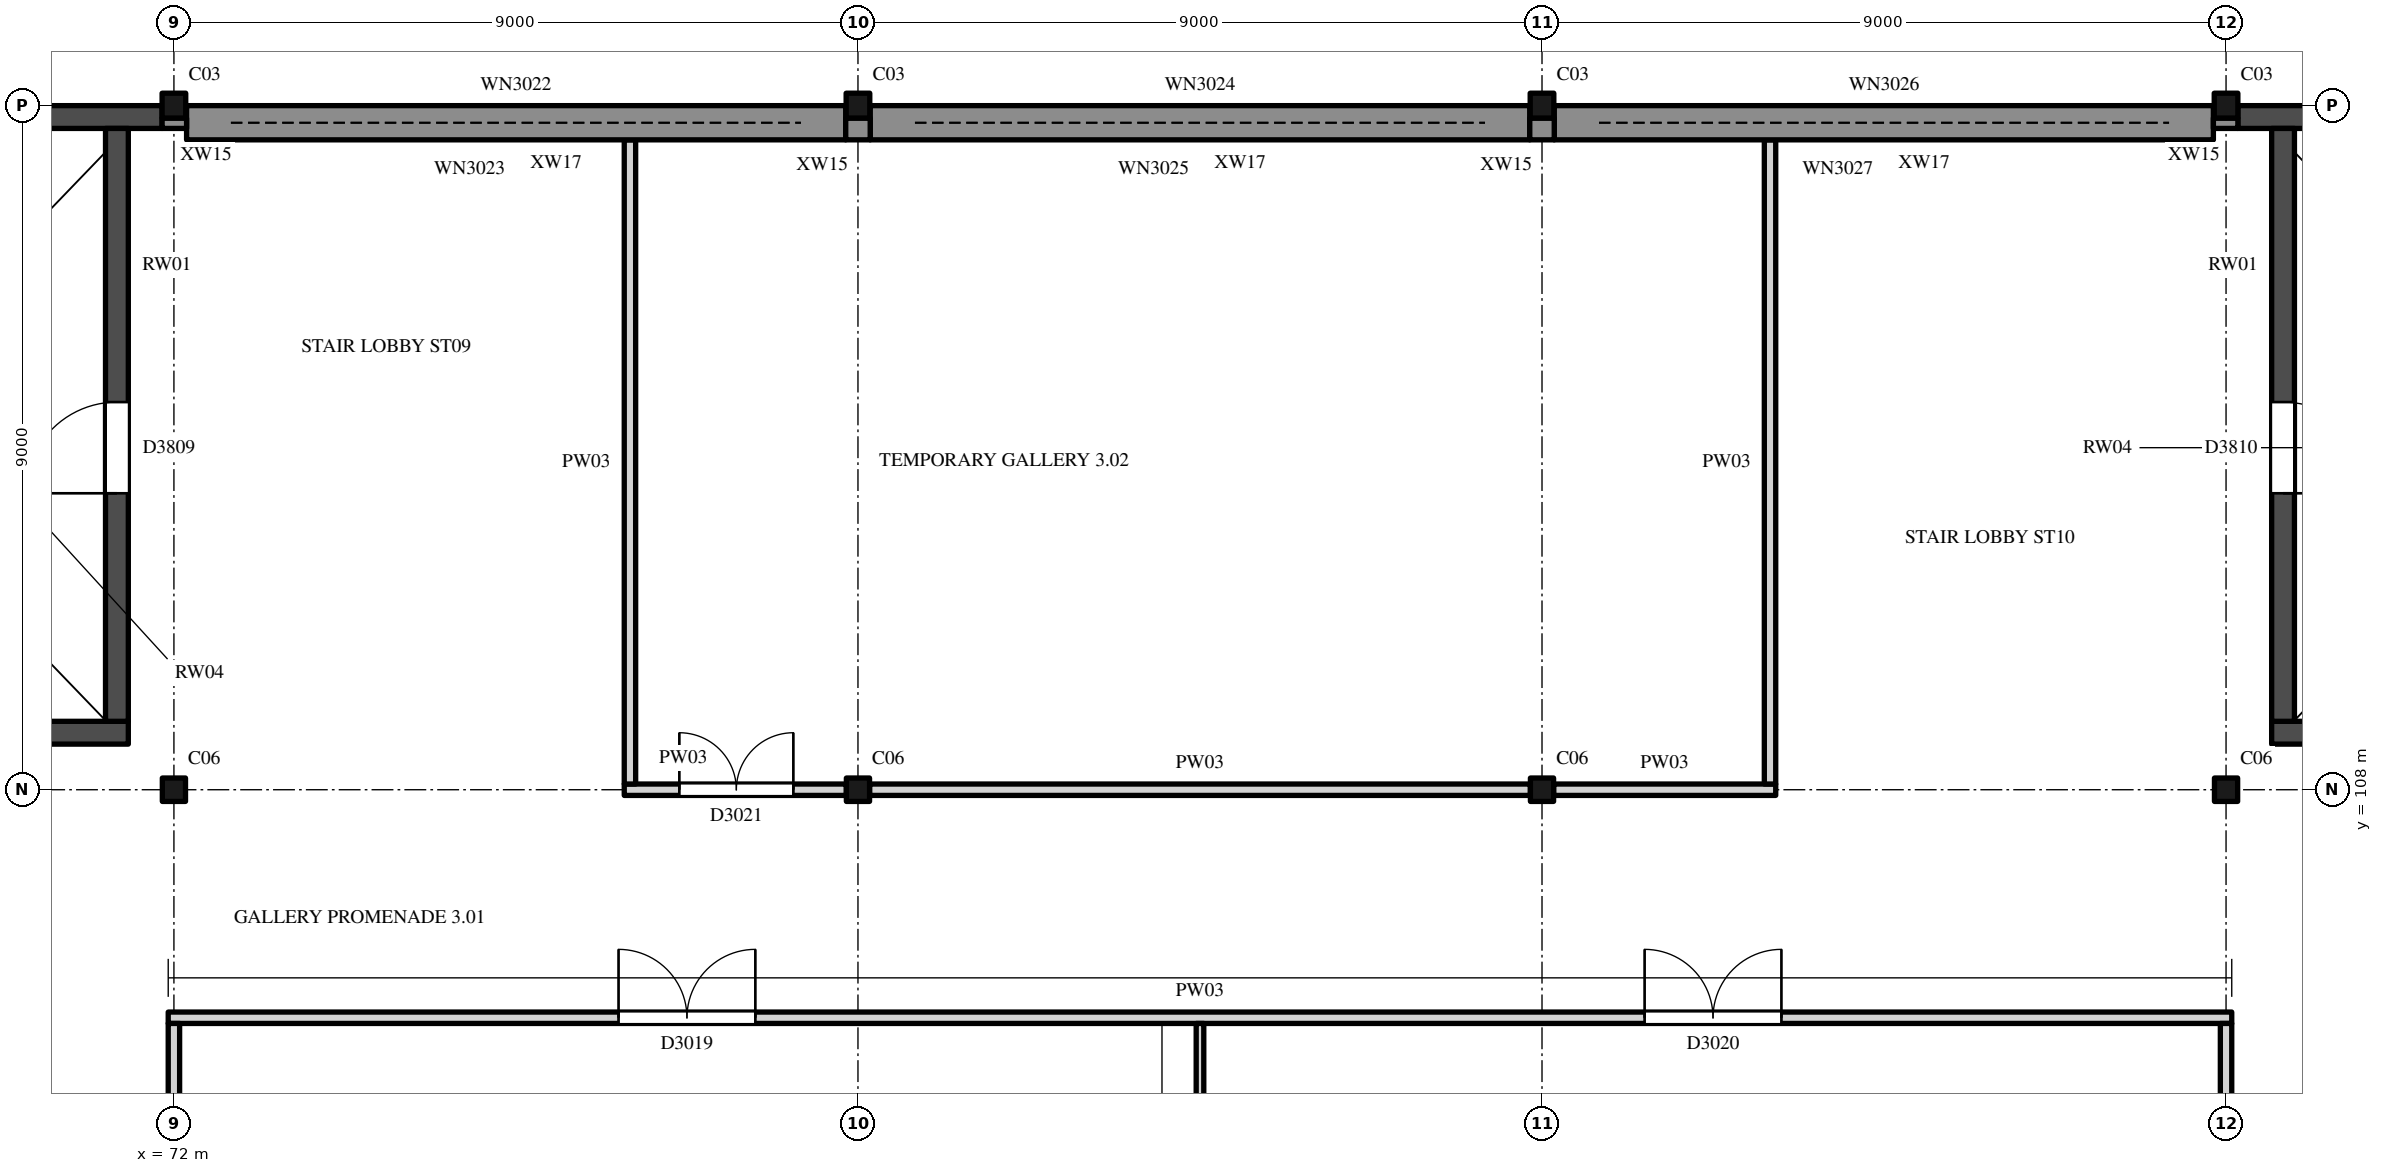
"""IFC4 building model, lengths in metres.
Left out: names, types, materials, properties, quantities, classifications, styles, units other than length and angle.
Written with IfcOpenShell. Run it as: python <this file> out.ifc"""

import sys

from ifc_helpers import new_model, si_unit, direction, frame, frame_2d, origin, origin_2d, place, context, subcontext, project, spatial, rectangle, i_section, extrude, element, fill, save


model = new_model("IFC4")
c1 = context("Model", 3, precision=1e-05, world=origin(), true_north=direction((0.0, 1.0)))
c2 = subcontext(c1, "Body", "Model", "MODEL_VIEW")
j1 = project(units=[si_unit("LENGTHUNIT", "METRE"), si_unit("PLANEANGLEUNIT", "RADIAN")], contexts=[c1])
p1 = place(None, origin())
s1 = spatial("IfcSite", under=j1, at=p1, CompositionType="ELEMENT")
p2 = place(p1, origin())
s2 = spatial("IfcBuilding", under=s1, at=p2, CompositionType="ELEMENT")
p3 = place(p2, frame((0.0, 0.0, 16.0)))
s3 = spatial("IfcBuildingStorey", under=s2, at=p3, CompositionType="ELEMENT", Elevation=16.0)
for number, where, z_axis, x_axis in (
    (1, (72.0, 108.0, 0.0), (0.0, 0.0, 1.0), (1.0, 0.0, 0.0)),
    (2, (81.0, 108.0, 0.0), (0.0, 0.0, 1.0), (1.0, 0.0, 0.0)),
    (3, (90.0, 108.0, 0.0), (0.0, 0.0, 1.0), (1.0, 0.0, 0.0)),
    (4, (99.0, 108.0, 0.0), (0.0, 0.0, 1.0), (1.0, 0.0, 0.0)),
):
    element("IfcColumn", number, at=place(p3, frame(where, z_axis=z_axis, x_axis=x_axis)), inside=s3, PredefinedType="COLUMN", context=c2, shape_type="SweptSolid", body=[
        extrude(i_section(OverallWidth=0.305, OverallDepth=0.308, WebThickness=0.01, FlangeThickness=0.015, FilletRadius=0.017, at=origin_2d()), origin(), (0.0, 0.0, 1.0), 10.0),
    ])
for number, where, z_axis, x_axis in (
    (5, (72.0, 117.0, 0.0), (0.0, 0.0, 1.0), (1.0, 0.0, 0.0)),
    (6, (81.0, 117.0, 0.0), (0.0, 0.0, 1.0), (1.0, 0.0, 0.0)),
    (7, (90.0, 117.0, 0.0), (0.0, 0.0, 1.0), (1.0, 0.0, 0.0)),
    (8, (99.0, 117.0, 0.0), (0.0, 0.0, 1.0), (1.0, 0.0, 0.0)),
):
    element("IfcColumn", number, at=place(p3, frame(where, z_axis=z_axis, x_axis=x_axis)), inside=s3, PredefinedType="COLUMN", context=c2, shape_type="SweptSolid", body=[
        extrude(i_section(OverallWidth=0.311, OverallDepth=0.327, WebThickness=0.016, FlangeThickness=0.025, FilletRadius=0.017, at=origin_2d()), origin(), (0.0, 0.0, 1.0), 10.0),
    ])
p4 = place(p3, frame((63.6, 108.75, 0.0), z_axis=(0.0, 0.0, 1.0), x_axis=(1.0, 0.0, 0.0)))
e9 = element("IfcWall", 9, at=p4, inside=s3, PredefinedType="SHEAR", context=c2, shape_type="SweptSolid", body=[
    extrude(rectangle(XDim=7.8, YDim=0.3, at=frame_2d((3.9, 0.0))), origin(), (0.0, 0.0, 1.0), 10.0),
])
p5 = place(p3, frame((63.156, 116.85, 0.0), z_axis=(0.0, 0.0, 1.0), x_axis=(1.0, 0.0, 0.0)))
e10 = element("IfcWall", 10, at=p5, inside=s3, PredefinedType="SHEAR", context=c2, shape_type="SweptSolid", body=[
    extrude(rectangle(XDim=8.689, YDim=0.3, at=frame_2d((4.344, 0.0))), origin(), (0.0, 0.0, 1.0), 10.0),
])
p6 = place(p3, frame((71.25, 108.9, 0.0), z_axis=(0.0, 0.0, 1.0), x_axis=(0.0, 1.0, 0.0)))
e11 = element("IfcWall", 11, at=p6, inside=s3, PredefinedType="SHEAR", context=c2, shape_type="SweptSolid", body=[
    extrude(rectangle(XDim=7.8, YDim=0.3, at=frame_2d((3.9, 0.0))), origin(), (0.0, 0.0, 1.0), 10.0),
])
p7 = place(p6, frame((3.0, 0.0, 0.0)))
e12 = element("IfcOpeningElement", 12, at=p7, cuts=e11, PredefinedType="OPENING", context=c2, shape_type="SweptSolid", body=[
    extrude(rectangle(XDim=1.2, YDim=2.1, at=frame_2d((0.6, 1.05))), frame((0.0, 0.16, 0.0), z_axis=(0.0, -1.0, 0.0), x_axis=(1.0, 0.0, 0.0)), (0.0, 0.0, 1.0), 0.32),
])
p8 = place(p3, frame((99.6, 108.75, 0.0), z_axis=(0.0, 0.0, 1.0), x_axis=(1.0, 0.0, 0.0)))
e13 = element("IfcWall", 13, at=p8, inside=s3, PredefinedType="SHEAR", context=c2, shape_type="SweptSolid", body=[
    extrude(rectangle(XDim=7.8, YDim=0.3, at=frame_2d((3.9, 0.0))), origin(), (0.0, 0.0, 1.0), 10.0),
])
p9 = place(p3, frame((99.156, 116.85, 0.0), z_axis=(0.0, 0.0, 1.0), x_axis=(1.0, 0.0, 0.0)))
e14 = element("IfcWall", 14, at=p9, inside=s3, PredefinedType="SHEAR", context=c2, shape_type="SweptSolid", body=[
    extrude(rectangle(XDim=8.689, YDim=0.3, at=frame_2d((4.344, 0.0))), origin(), (0.0, 0.0, 1.0), 10.0),
])
p10 = place(p3, frame((99.75, 108.9, 0.0), z_axis=(0.0, 0.0, 1.0), x_axis=(0.0, 1.0, 0.0)))
e15 = element("IfcWall", 15, at=p10, inside=s3, PredefinedType="SHEAR", context=c2, shape_type="SweptSolid", body=[
    extrude(rectangle(XDim=7.8, YDim=0.3, at=frame_2d((3.9, 0.0))), origin(), (0.0, 0.0, 1.0), 10.0),
])
p11 = place(p10, frame((3.0, 0.0, 0.0)))
e16 = element("IfcOpeningElement", 16, at=p11, cuts=e15, PredefinedType="OPENING", context=c2, shape_type="SweptSolid", body=[
    extrude(rectangle(XDim=1.2, YDim=2.1, at=frame_2d((0.6, 1.05))), frame((0.0, 0.16, 0.0), z_axis=(0.0, -1.0, 0.0), x_axis=(1.0, 0.0, 0.0)), (0.0, 0.0, 1.0), 0.32),
])
p12 = place(p3, frame((72.167, 116.775, 0.0), z_axis=(0.0, 0.0, 1.0), x_axis=(1.0, 0.0, 0.0)))
e17 = element("IfcWall", 17, at=p12, inside=s3, PredefinedType="SOLIDWALL", context=c2, shape_type="SweptSolid", body=[
    extrude(rectangle(XDim=8.673, YDim=0.45, at=frame_2d((4.336, 0.0))), origin(), (0.0, 0.0, 1.0), 9.473),
])
p13 = place(p12, frame((0.583, 0.0, 1.6)))
e18 = element("IfcOpeningElement", 18, at=p13, cuts=e17, PredefinedType="OPENING", context=c2, shape_type="SweptSolid", body=[
    extrude(rectangle(XDim=7.5, YDim=1.2, at=frame_2d((3.75, 0.6))), frame((0.0, 0.235, 0.0), z_axis=(0.0, -1.0, 0.0), x_axis=(1.0, 0.0, 0.0)), (0.0, 0.0, 1.0), 0.47),
])
p14 = place(p12, frame((0.583, 0.0, 6.4)))
e19 = element("IfcOpeningElement", 19, at=p14, cuts=e17, PredefinedType="OPENING", context=c2, shape_type="SweptSolid", body=[
    extrude(rectangle(XDim=7.5, YDim=1.2, at=frame_2d((3.75, 0.6))), frame((0.0, 0.235, 0.0), z_axis=(0.0, -1.0, 0.0), x_axis=(1.0, 0.0, 0.0)), (0.0, 0.0, 1.0), 0.47),
])
p15 = place(p3, frame((81.161, 116.775, 0.0), z_axis=(0.0, 0.0, 1.0), x_axis=(1.0, 0.0, 0.0)))
e20 = element("IfcWall", 20, at=p15, inside=s3, PredefinedType="SOLIDWALL", context=c2, shape_type="SweptSolid", body=[
    extrude(rectangle(XDim=8.678, YDim=0.45, at=frame_2d((4.339, 0.0))), origin(), (0.0, 0.0, 1.0), 9.473),
])
p16 = place(p15, frame((0.589, 0.0, 1.6)))
e21 = element("IfcOpeningElement", 21, at=p16, cuts=e20, PredefinedType="OPENING", context=c2, shape_type="SweptSolid", body=[
    extrude(rectangle(XDim=7.5, YDim=1.2, at=frame_2d((3.75, 0.6))), frame((0.0, 0.235, 0.0), z_axis=(0.0, -1.0, 0.0), x_axis=(1.0, 0.0, 0.0)), (0.0, 0.0, 1.0), 0.47),
])
p17 = place(p15, frame((0.589, 0.0, 6.4)))
e22 = element("IfcOpeningElement", 22, at=p17, cuts=e20, PredefinedType="OPENING", context=c2, shape_type="SweptSolid", body=[
    extrude(rectangle(XDim=7.5, YDim=1.2, at=frame_2d((3.75, 0.6))), frame((0.0, 0.235, 0.0), z_axis=(0.0, -1.0, 0.0), x_axis=(1.0, 0.0, 0.0)), (0.0, 0.0, 1.0), 0.47),
])
p18 = place(p3, frame((90.161, 116.775, 0.0), z_axis=(0.0, 0.0, 1.0), x_axis=(1.0, 0.0, 0.0)))
e23 = element("IfcWall", 23, at=p18, inside=s3, PredefinedType="SOLIDWALL", context=c2, shape_type="SweptSolid", body=[
    extrude(rectangle(XDim=8.673, YDim=0.45, at=frame_2d((4.336, 0.0))), origin(), (0.0, 0.0, 1.0), 9.473),
])
p19 = place(p18, frame((0.589, 0.0, 1.6)))
e24 = element("IfcOpeningElement", 24, at=p19, cuts=e23, PredefinedType="OPENING", context=c2, shape_type="SweptSolid", body=[
    extrude(rectangle(XDim=7.5, YDim=1.2, at=frame_2d((3.75, 0.6))), frame((0.0, 0.235, 0.0), z_axis=(0.0, -1.0, 0.0), x_axis=(1.0, 0.0, 0.0)), (0.0, 0.0, 1.0), 0.47),
])
p20 = place(p18, frame((0.589, 0.0, 6.4)))
e25 = element("IfcOpeningElement", 25, at=p20, cuts=e23, PredefinedType="OPENING", context=c2, shape_type="SweptSolid", body=[
    extrude(rectangle(XDim=7.5, YDim=1.2, at=frame_2d((3.75, 0.6))), frame((0.0, 0.235, 0.0), z_axis=(0.0, -1.0, 0.0), x_axis=(1.0, 0.0, 0.0)), (0.0, 0.0, 1.0), 0.47),
])
p21 = place(p3, frame((71.844, 116.768, 0.0), z_axis=(0.0, 0.0, 1.0), x_axis=(1.0, 0.0, 0.0)))
e26 = element("IfcWall", 26, at=p21, inside=s3, PredefinedType="SOLIDWALL", context=c2, shape_type="SweptSolid", body=[
    extrude(rectangle(XDim=0.322, YDim=0.136, at=frame_2d((0.161, 0.0))), origin(), (0.0, 0.0, 1.0), 10.0),
])
for number, where, z_axis, x_axis in (
    (27, (80.839, 116.693, 0.0), (0.0, 0.0, 1.0), (1.0, 0.0, 0.0)),
    (28, (89.839, 116.693, 0.0), (0.0, 0.0, 1.0), (1.0, 0.0, 0.0)),
):
    element("IfcWall", number, at=place(p3, frame(where, z_axis=z_axis, x_axis=x_axis)), inside=s3, PredefinedType="SOLIDWALL", context=c2, shape_type="SweptSolid", body=[
        extrude(rectangle(XDim=0.322, YDim=0.286, at=frame_2d((0.161, 0.0))), origin(), (0.0, 0.0, 1.0), 9.473),
    ])
p22 = place(p3, frame((98.833, 116.768, 0.0), z_axis=(0.0, 0.0, 1.0), x_axis=(1.0, 0.0, 0.0)))
e29 = element("IfcWall", 29, at=p22, inside=s3, PredefinedType="SOLIDWALL", context=c2, shape_type="SweptSolid", body=[
    extrude(rectangle(XDim=0.322, YDim=0.136, at=frame_2d((0.161, 0.0))), origin(), (0.0, 0.0, 1.0), 10.0),
])
p23 = place(p3, frame((71.925, 105.0, 0.0), z_axis=(0.0, 0.0, 1.0), x_axis=(1.0, 0.0, 0.0)))
e30 = element("IfcWall", 30, at=p23, inside=s3, PredefinedType="PARTITIONING", context=c2, shape_type="SweptSolid", body=[
    extrude(rectangle(XDim=27.15, YDim=0.15, at=frame_2d((13.575, 0.0))), origin(), (0.0, 0.0, 1.0), 9.521),
])
p24 = place(p23, frame((5.925, 0.0, 0.0)))
e31 = element("IfcOpeningElement", 31, at=p24, cuts=e30, PredefinedType="OPENING", context=c2, shape_type="SweptSolid", body=[
    extrude(rectangle(XDim=1.8, YDim=2.4, at=frame_2d((0.9, 1.2))), frame((0.0, 0.085, 0.0), z_axis=(0.0, -1.0, 0.0), x_axis=(1.0, 0.0, 0.0)), (0.0, 0.0, 1.0), 0.17),
])
p25 = place(p23, frame((19.425, 0.0, 0.0)))
e32 = element("IfcOpeningElement", 32, at=p25, cuts=e30, PredefinedType="OPENING", context=c2, shape_type="SweptSolid", body=[
    extrude(rectangle(XDim=1.8, YDim=2.4, at=frame_2d((0.9, 1.2))), frame((0.0, 0.085, 0.0), z_axis=(0.0, -1.0, 0.0), x_axis=(1.0, 0.0, 0.0)), (0.0, 0.0, 1.0), 0.17),
])
p26 = place(p3, frame((77.925, 108.0, 0.0), z_axis=(0.0, 0.0, 1.0), x_axis=(1.0, 0.0, 0.0)))
e33 = element("IfcWall", 33, at=p26, inside=s3, PredefinedType="PARTITIONING", context=c2, shape_type="SweptSolid", body=[
    extrude(rectangle(XDim=2.922, YDim=0.15, at=frame_2d((1.461, 0.0))), origin(), (0.0, 0.0, 1.0), 9.473),
])
p27 = place(p26, frame((0.725, 0.0, 0.0)))
e34 = element("IfcOpeningElement", 34, at=p27, cuts=e33, PredefinedType="OPENING", context=c2, shape_type="SweptSolid", body=[
    extrude(rectangle(XDim=1.5, YDim=2.4, at=frame_2d((0.75, 1.2))), frame((0.0, 0.085, 0.0), z_axis=(0.0, -1.0, 0.0), x_axis=(1.0, 0.0, 0.0)), (0.0, 0.0, 1.0), 0.17),
])
p28 = place(p3, frame((81.153, 108.0, 0.0), z_axis=(0.0, 0.0, 1.0), x_axis=(1.0, 0.0, 0.0)))
e35 = element("IfcWall", 35, at=p28, inside=s3, PredefinedType="PARTITIONING", context=c2, shape_type="SweptSolid", body=[
    extrude(rectangle(XDim=8.695, YDim=0.15, at=frame_2d((4.347, 0.0))), origin(), (0.0, 0.0, 1.0), 9.473),
])
p29 = place(p3, frame((90.153, 108.0, 0.0), z_axis=(0.0, 0.0, 1.0), x_axis=(1.0, 0.0, 0.0)))
e36 = element("IfcWall", 36, at=p29, inside=s3, PredefinedType="PARTITIONING", context=c2, shape_type="SweptSolid", body=[
    extrude(rectangle(XDim=2.922, YDim=0.15, at=frame_2d((1.461, 0.0))), origin(), (0.0, 0.0, 1.0), 9.473),
])
p30 = place(p3, frame((72.0, 99.154, 0.0), z_axis=(0.0, 0.0, 1.0), x_axis=(0.0, 1.0, 0.0)))
e37 = element("IfcWall", 37, at=p30, inside=s3, PredefinedType="PARTITIONING", context=c2, shape_type="SweptSolid", body=[
    extrude(rectangle(XDim=5.771, YDim=0.15, at=frame_2d((2.885, 0.0))), origin(), (0.0, 0.0, 1.0), 9.371),
])
p31 = place(p3, frame((78.0, 108.075, 0.0), z_axis=(0.0, 0.0, 1.0), x_axis=(0.0, 1.0, 0.0)))
e38 = element("IfcWall", 38, at=p31, inside=s3, PredefinedType="PARTITIONING", context=c2, shape_type="SweptSolid", body=[
    extrude(rectangle(XDim=8.475, YDim=0.15, at=frame_2d((4.238, 0.0))), origin(), (0.0, 0.0, 1.0), 9.825),
])
p32 = place(p3, frame((85.5, 90.05, 0.0), z_axis=(0.0, 0.0, 1.0), x_axis=(0.0, 1.0, 0.0)))
e39 = element("IfcWall", 39, at=p32, inside=s3, PredefinedType="PARTITIONING", context=c2, shape_type="SweptSolid", body=[
    extrude(rectangle(XDim=14.875, YDim=0.1, at=frame_2d((7.438, 0.0))), origin(), (0.0, 0.0, 1.0), 9.825),
])
p33 = place(p32, frame((6.55, 0.0, 0.0)))
e40 = element("IfcOpeningElement", 40, at=p33, cuts=e39, PredefinedType="OPENING", context=c2, shape_type="SweptSolid", body=[
    extrude(rectangle(XDim=1.8, YDim=2.4, at=frame_2d((0.9, 1.2))), frame((0.0, 0.06, 0.0), z_axis=(0.0, -1.0, 0.0), x_axis=(1.0, 0.0, 0.0)), (0.0, 0.0, 1.0), 0.12),
])
p34 = place(p3, frame((93.0, 108.075, 0.0), z_axis=(0.0, 0.0, 1.0), x_axis=(0.0, 1.0, 0.0)))
e41 = element("IfcWall", 41, at=p34, inside=s3, PredefinedType="PARTITIONING", context=c2, shape_type="SweptSolid", body=[
    extrude(rectangle(XDim=8.475, YDim=0.15, at=frame_2d((4.238, 0.0))), origin(), (0.0, 0.0, 1.0), 9.825),
])
p35 = place(p3, frame((99.0, 99.154, 0.0), z_axis=(0.0, 0.0, 1.0), x_axis=(0.0, 1.0, 0.0)))
e42 = element("IfcWall", 42, at=p35, inside=s3, PredefinedType="PARTITIONING", context=c2, shape_type="SweptSolid", body=[
    extrude(rectangle(XDim=5.771, YDim=0.15, at=frame_2d((2.885, 0.0))), origin(), (0.0, 0.0, 1.0), 9.371),
])
p36 = place(p7, origin())
e43 = element("IfcDoor", 43, at=p36, inside=s3, OperationType="SINGLE_SWING_RIGHT", PredefinedType="DOOR", context=c2, shape_type="SweptSolid", body=[
    extrude(rectangle(XDim=1.2, YDim=2.1, at=frame_2d((0.6, 1.05))), frame((0.0, 0.025, 0.0), z_axis=(0.0, -1.0, 0.0), x_axis=(1.0, 0.0, 0.0)), (0.0, 0.0, 1.0), 0.05),
])
fill(e12, e43)
p37 = place(p11, origin())
e44 = element("IfcDoor", 44, at=p37, inside=s3, OperationType="SINGLE_SWING_LEFT", PredefinedType="DOOR", context=c2, shape_type="SweptSolid", body=[
    extrude(rectangle(XDim=1.2, YDim=2.1, at=frame_2d((0.6, 1.05))), frame((0.0, 0.025, 0.0), z_axis=(0.0, -1.0, 0.0), x_axis=(1.0, 0.0, 0.0)), (0.0, 0.0, 1.0), 0.05),
])
fill(e16, e44)
p38 = place(p13, origin())
e45 = element("IfcWindow", 45, at=p38, inside=s3, PartitioningType="SINGLE_PANEL", PredefinedType="WINDOW", context=c2, shape_type="SweptSolid", body=[
    extrude(rectangle(XDim=7.5, YDim=1.2, at=frame_2d((3.75, 0.6))), frame((0.0, 0.03, 0.0), z_axis=(0.0, -1.0, 0.0), x_axis=(1.0, 0.0, 0.0)), (0.0, 0.0, 1.0), 0.06),
])
fill(e18, e45)
p39 = place(p14, origin())
e46 = element("IfcWindow", 46, at=p39, inside=s3, PartitioningType="SINGLE_PANEL", PredefinedType="WINDOW", context=c2, shape_type="SweptSolid", body=[
    extrude(rectangle(XDim=7.5, YDim=1.2, at=frame_2d((3.75, 0.6))), frame((0.0, 0.03, 0.0), z_axis=(0.0, -1.0, 0.0), x_axis=(1.0, 0.0, 0.0)), (0.0, 0.0, 1.0), 0.06),
])
fill(e19, e46)
p40 = place(p16, origin())
e47 = element("IfcWindow", 47, at=p40, inside=s3, PartitioningType="SINGLE_PANEL", PredefinedType="WINDOW", context=c2, shape_type="SweptSolid", body=[
    extrude(rectangle(XDim=7.5, YDim=1.2, at=frame_2d((3.75, 0.6))), frame((0.0, 0.03, 0.0), z_axis=(0.0, -1.0, 0.0), x_axis=(1.0, 0.0, 0.0)), (0.0, 0.0, 1.0), 0.06),
])
fill(e21, e47)
p41 = place(p17, origin())
e48 = element("IfcWindow", 48, at=p41, inside=s3, PartitioningType="SINGLE_PANEL", PredefinedType="WINDOW", context=c2, shape_type="SweptSolid", body=[
    extrude(rectangle(XDim=7.5, YDim=1.2, at=frame_2d((3.75, 0.6))), frame((0.0, 0.03, 0.0), z_axis=(0.0, -1.0, 0.0), x_axis=(1.0, 0.0, 0.0)), (0.0, 0.0, 1.0), 0.06),
])
fill(e22, e48)
p42 = place(p19, origin())
e49 = element("IfcWindow", 49, at=p42, inside=s3, PartitioningType="SINGLE_PANEL", PredefinedType="WINDOW", context=c2, shape_type="SweptSolid", body=[
    extrude(rectangle(XDim=7.5, YDim=1.2, at=frame_2d((3.75, 0.6))), frame((0.0, 0.03, 0.0), z_axis=(0.0, -1.0, 0.0), x_axis=(1.0, 0.0, 0.0)), (0.0, 0.0, 1.0), 0.06),
])
fill(e24, e49)
p43 = place(p20, origin())
e50 = element("IfcWindow", 50, at=p43, inside=s3, PartitioningType="SINGLE_PANEL", PredefinedType="WINDOW", context=c2, shape_type="SweptSolid", body=[
    extrude(rectangle(XDim=7.5, YDim=1.2, at=frame_2d((3.75, 0.6))), frame((0.0, 0.03, 0.0), z_axis=(0.0, -1.0, 0.0), x_axis=(1.0, 0.0, 0.0)), (0.0, 0.0, 1.0), 0.06),
])
fill(e25, e50)
p44 = place(p24, origin())
e51 = element("IfcDoor", 51, at=p44, inside=s3, OperationType="DOUBLE_DOOR_SINGLE_SWING", PredefinedType="DOOR", context=c2, shape_type="SweptSolid", body=[
    extrude(rectangle(XDim=1.8, YDim=2.4, at=frame_2d((0.9, 1.2))), frame((0.0, 0.025, 0.0), z_axis=(0.0, -1.0, 0.0), x_axis=(1.0, 0.0, 0.0)), (0.0, 0.0, 1.0), 0.05),
])
fill(e31, e51)
p45 = place(p25, origin())
e52 = element("IfcDoor", 52, at=p45, inside=s3, OperationType="DOUBLE_DOOR_SINGLE_SWING", PredefinedType="DOOR", context=c2, shape_type="SweptSolid", body=[
    extrude(rectangle(XDim=1.8, YDim=2.4, at=frame_2d((0.9, 1.2))), frame((0.0, 0.025, 0.0), z_axis=(0.0, -1.0, 0.0), x_axis=(1.0, 0.0, 0.0)), (0.0, 0.0, 1.0), 0.05),
])
fill(e32, e52)
p46 = place(p27, origin())
e53 = element("IfcDoor", 53, at=p46, inside=s3, OperationType="DOUBLE_DOOR_SINGLE_SWING", PredefinedType="DOOR", context=c2, shape_type="SweptSolid", body=[
    extrude(rectangle(XDim=1.5, YDim=2.4, at=frame_2d((0.75, 1.2))), frame((0.0, 0.025, 0.0), z_axis=(0.0, -1.0, 0.0), x_axis=(1.0, 0.0, 0.0)), (0.0, 0.0, 1.0), 0.05),
])
fill(e34, e53)
save(model, sys.argv[1])
